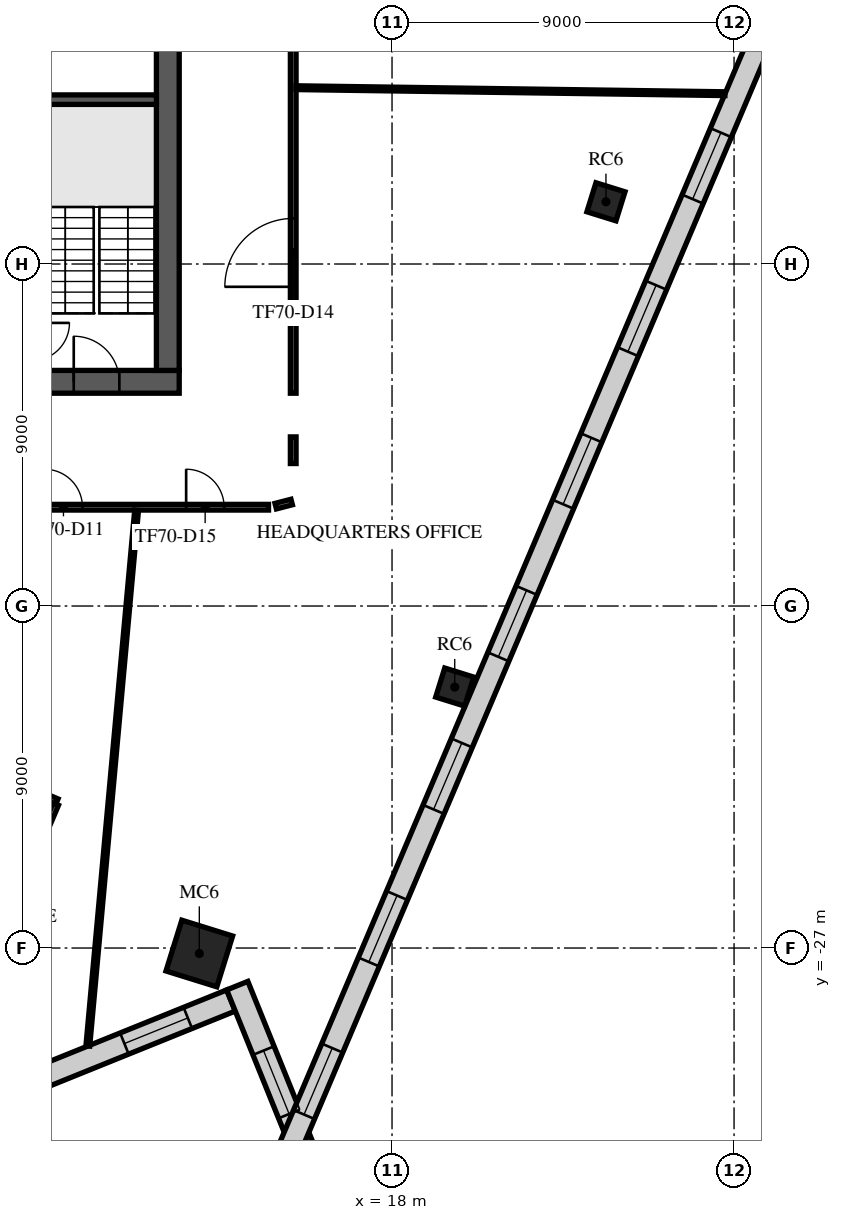
"""IFC4 building model, lengths in metres.
Left out: names, types, materials, properties, quantities, classifications, styles, units other than length and angle.
Written with IfcOpenShell. Run it as: python <this file> out.ifc"""

import sys

from ifc_helpers import new_model, si_unit, direction, frame, frame_2d, origin, origin_2d, place, context, subcontext, project, spatial, rectangle, extrude, element, fill, save


model = new_model("IFC4")
c1 = context("Model", 3, precision=1e-05, world=origin(), true_north=direction((0.0, 1.0)))
c2 = subcontext(c1, "Body", "Model", "MODEL_VIEW")
j1 = project(units=[si_unit("LENGTHUNIT", "METRE"), si_unit("PLANEANGLEUNIT", "RADIAN")], contexts=[c1])
p1 = place(None, origin())
s1 = spatial("IfcSite", under=j1, at=p1, CompositionType="ELEMENT")
p2 = place(p1, origin())
s2 = spatial("IfcBuilding", under=s1, at=p2, CompositionType="ELEMENT")
p3 = place(p2, frame((0.0, 0.0, 300.5)))
s3 = spatial("IfcBuildingStorey", under=s2, at=p3, CompositionType="ELEMENT", Elevation=300.5)
p4 = place(p3, frame((12.929, -27.144, 0.0), z_axis=(0.0, 0.0, 1.0), x_axis=(0.297503182032, 0.954720826567, 0.0)))
e1 = element("IfcColumn", 1, at=p4, inside=s3, PredefinedType="COLUMN", context=c2, shape_type="SweptSolid", body=[
    extrude(rectangle(XDim=1.4, YDim=1.4, at=origin_2d()), origin(), (0.0, 0.0, 1.0), 4.0),
])
for number, where, z_axis, x_axis in (
    (2, (19.65, -20.133, 0.0), (0.0, 0.0, 1.0), (0.298, 0.955, 0.0)),
    (3, (23.629, -7.363, 0.0), (0.0, 0.0, 1.0), (0.298, 0.955, 0.0)),
):
    element("IfcColumn", number, at=place(p3, frame(where, z_axis=z_axis, x_axis=x_axis)), inside=s3, PredefinedType="COLUMN", context=c2, shape_type="SweptSolid", body=[
        extrude(rectangle(XDim=0.8, YDim=0.8, at=origin_2d()), origin(), (0.0, 0.0, 1.0), 4.0),
    ])
p5 = place(p3, frame((-12.4, -12.1, 0.0), z_axis=(0.0, 0.0, 1.0), x_axis=(1.0, 0.0, 0.0)))
e4 = element("IfcWall", 4, at=p5, inside=s3, PredefinedType="SHEAR", context=c2, shape_type="SweptSolid", body=[
    extrude(rectangle(XDim=24.8, YDim=0.6, at=frame_2d((12.4, 0.0))), origin(), (0.0, 0.0, 1.0), 3.65),
])
p6 = place(p5, frame((7.3, 0.0, 0.0)))
e5 = element("IfcOpeningElement", 5, at=p6, cuts=e4, PredefinedType="OPENING", context=c2, shape_type="SweptSolid", body=[
    extrude(rectangle(XDim=2.0, YDim=2.1, at=frame_2d((1.0, 1.05))), frame((0.0, 0.31, 0.0), z_axis=(0.0, -1.0, 0.0), x_axis=(1.0, 0.0, 0.0)), (0.0, 0.0, 1.0), 0.62),
])
p7 = place(p5, frame((17.425, 0.0, 0.0)))
e6 = element("IfcOpeningElement", 6, at=p7, cuts=e4, PredefinedType="OPENING", context=c2, shape_type="SweptSolid", body=[
    extrude(rectangle(XDim=1.2, YDim=2.1, at=frame_2d((0.6, 1.05))), frame((0.0, 0.31, 0.0), z_axis=(0.0, -1.0, 0.0), x_axis=(1.0, 0.0, 0.0)), (0.0, 0.0, 1.0), 0.62),
])
p8 = place(p5, frame((1.575, 0.0, 0.0)))
e7 = element("IfcOpeningElement", 7, at=p8, cuts=e4, PredefinedType="OPENING", context=c2, shape_type="SweptSolid", body=[
    extrude(rectangle(XDim=1.2, YDim=2.1, at=frame_2d((0.6, 1.05))), frame((0.0, 0.31, 0.0), z_axis=(0.0, -1.0, 0.0), x_axis=(1.0, 0.0, 0.0)), (0.0, 0.0, 1.0), 0.62),
])
p9 = place(p5, frame((22.025, 0.0, 0.0)))
e8 = element("IfcOpeningElement", 8, at=p9, cuts=e4, PredefinedType="OPENING", context=c2, shape_type="SweptSolid", body=[
    extrude(rectangle(XDim=1.2, YDim=2.1, at=frame_2d((0.6, 1.05))), frame((0.0, 0.31, 0.0), z_axis=(0.0, -1.0, 0.0), x_axis=(1.0, 0.0, 0.0)), (0.0, 0.0, 1.0), 0.62),
])
p10 = place(p3, frame((12.1, -11.8, 0.0), z_axis=(0.0, 0.0, 1.0), x_axis=(0.0, 1.0, 0.0)))
e9 = element("IfcWall", 9, at=p10, inside=s3, PredefinedType="SHEAR", context=c2, shape_type="SweptSolid", body=[
    extrude(rectangle(XDim=23.6, YDim=0.6, at=frame_2d((11.8, 0.0))), origin(), (0.0, 0.0, 1.0), 3.65),
])
p11 = place(p10, frame((10.6, 0.0, 0.0)))
e10 = element("IfcOpeningElement", 10, at=p11, cuts=e9, PredefinedType="OPENING", context=c2, shape_type="SweptSolid", body=[
    extrude(rectangle(XDim=2.4, YDim=2.4, at=frame_2d((1.2, 1.2))), frame((0.0, 0.31, 0.0), z_axis=(0.0, -1.0, 0.0), x_axis=(1.0, 0.0, 0.0)), (0.0, 0.0, 1.0), 0.62),
])
p12 = place(p3, frame((8.65, -4.675, 0.0), z_axis=(0.0, 0.0, 1.0), x_axis=(1.0, 0.0, 0.0)))
e11 = element("IfcWall", 11, at=p12, inside=s3, PredefinedType="SOLIDWALL", context=c2, shape_type="SweptSolid", body=[
    extrude(rectangle(XDim=3.15, YDim=0.25, at=frame_2d((1.575, 0.0))), origin(), (0.0, 0.0, 1.0), 3.65),
])
p13 = place(p3, frame((5.881, -31.565, 0.0), z_axis=(0.0, 0.0, 1.0), x_axis=(0.927187551636, 0.37459744272, 0.0)))
e12 = element("IfcWall", 12, at=p13, inside=s3, PredefinedType="STANDARD", context=c2, shape_type="SweptSolid", body=[
    extrude(rectangle(XDim=8.5, YDim=0.6, at=frame_2d((4.25, 0.0))), origin(), (0.0, 0.0, 1.0), 3.65),
])
p14 = place(p13, frame((1.225, 0.0, 0.9)))
e13 = element("IfcOpeningElement", 13, at=p14, cuts=e12, PredefinedType="OPENING", context=c2, shape_type="SweptSolid", body=[
    extrude(rectangle(XDim=1.8, YDim=2.1, at=frame_2d((0.9, 1.05))), frame((0.0, 0.31, 0.0), z_axis=(0.0, -1.0, 0.0), x_axis=(1.0, 0.0, 0.0)), (0.0, 0.0, 1.0), 0.62),
])
p15 = place(p13, frame((5.475, 0.0, 0.9)))
e14 = element("IfcOpeningElement", 14, at=p15, cuts=e12, PredefinedType="OPENING", context=c2, shape_type="SweptSolid", body=[
    extrude(rectangle(XDim=1.8, YDim=2.1, at=frame_2d((0.9, 1.05))), frame((0.0, 0.31, 0.0), z_axis=(0.0, -1.0, 0.0), x_axis=(1.0, 0.0, 0.0)), (0.0, 0.0, 1.0), 0.62),
])
p16 = place(p3, frame((13.928, -27.99, 0.0), z_axis=(0.0, 0.0, 1.0), x_axis=(0.374576238335, -0.927196118238, 0.0)))
e15 = element("IfcWall", 15, at=p16, inside=s3, PredefinedType="STANDARD", context=c2, shape_type="SweptSolid", body=[
    extrude(rectangle(XDim=4.886, YDim=0.6, at=frame_2d((2.443, 0.0))), origin(), (0.0, 0.0, 1.0), 3.65),
])
p17 = place(p16, frame((1.843, 0.0, 0.9)))
e16 = element("IfcOpeningElement", 16, at=p17, cuts=e15, PredefinedType="OPENING", context=c2, shape_type="SweptSolid", body=[
    extrude(rectangle(XDim=1.8, YDim=2.1, at=frame_2d((0.9, 1.05))), frame((0.0, 0.31, 0.0), z_axis=(0.0, -1.0, 0.0), x_axis=(1.0, 0.0, 0.0)), (0.0, 0.0, 1.0), 0.62),
])
p18 = place(p3, frame((15.204, -32.515, 0.0), z_axis=(0.0, 0.0, 1.0), x_axis=(0.390728997462, 0.920505758017, 0.0)))
e17 = element("IfcWall", 17, at=p18, inside=s3, PredefinedType="STANDARD", context=c2, shape_type="SweptSolid", body=[
    extrude(rectangle(XDim=47.979, YDim=0.6, at=frame_2d((23.99, 0.0))), origin(), (0.0, 0.0, 1.0), 3.65),
])
p19 = place(p18, frame((1.231, 0.0, 0.9)))
e18 = element("IfcOpeningElement", 18, at=p19, cuts=e17, PredefinedType="OPENING", context=c2, shape_type="SweptSolid", body=[
    extrude(rectangle(XDim=1.9, YDim=2.1, at=frame_2d((0.95, 1.05))), frame((0.0, 0.31, 0.0), z_axis=(0.0, -1.0, 0.0), x_axis=(1.0, 0.0, 0.0)), (0.0, 0.0, 1.0), 0.62),
])
p20 = place(p18, frame((5.593, 0.0, 0.9)))
e19 = element("IfcOpeningElement", 19, at=p20, cuts=e17, PredefinedType="OPENING", context=c2, shape_type="SweptSolid", body=[
    extrude(rectangle(XDim=1.9, YDim=2.1, at=frame_2d((0.95, 1.05))), frame((0.0, 0.31, 0.0), z_axis=(0.0, -1.0, 0.0), x_axis=(1.0, 0.0, 0.0)), (0.0, 0.0, 1.0), 0.62),
])
p21 = place(p18, frame((9.954, 0.0, 0.9)))
e20 = element("IfcOpeningElement", 20, at=p21, cuts=e17, PredefinedType="OPENING", context=c2, shape_type="SweptSolid", body=[
    extrude(rectangle(XDim=1.9, YDim=2.1, at=frame_2d((0.95, 1.05))), frame((0.0, 0.31, 0.0), z_axis=(0.0, -1.0, 0.0), x_axis=(1.0, 0.0, 0.0)), (0.0, 0.0, 1.0), 0.62),
])
p22 = place(p18, frame((14.316, 0.0, 0.9)))
e21 = element("IfcOpeningElement", 21, at=p22, cuts=e17, PredefinedType="OPENING", context=c2, shape_type="SweptSolid", body=[
    extrude(rectangle(XDim=1.9, YDim=2.1, at=frame_2d((0.95, 1.05))), frame((0.0, 0.31, 0.0), z_axis=(0.0, -1.0, 0.0), x_axis=(1.0, 0.0, 0.0)), (0.0, 0.0, 1.0), 0.62),
])
p23 = place(p18, frame((18.678, 0.0, 0.9)))
e22 = element("IfcOpeningElement", 22, at=p23, cuts=e17, PredefinedType="OPENING", context=c2, shape_type="SweptSolid", body=[
    extrude(rectangle(XDim=1.9, YDim=2.1, at=frame_2d((0.95, 1.05))), frame((0.0, 0.31, 0.0), z_axis=(0.0, -1.0, 0.0), x_axis=(1.0, 0.0, 0.0)), (0.0, 0.0, 1.0), 0.62),
])
p24 = place(p18, frame((23.04, 0.0, 0.9)))
e23 = element("IfcOpeningElement", 23, at=p24, cuts=e17, PredefinedType="OPENING", context=c2, shape_type="SweptSolid", body=[
    extrude(rectangle(XDim=1.9, YDim=2.1, at=frame_2d((0.95, 1.05))), frame((0.0, 0.31, 0.0), z_axis=(0.0, -1.0, 0.0), x_axis=(1.0, 0.0, 0.0)), (0.0, 0.0, 1.0), 0.62),
])
p25 = place(p18, frame((27.401, 0.0, 0.9)))
e24 = element("IfcOpeningElement", 24, at=p25, cuts=e17, PredefinedType="OPENING", context=c2, shape_type="SweptSolid", body=[
    extrude(rectangle(XDim=1.9, YDim=2.1, at=frame_2d((0.95, 1.05))), frame((0.0, 0.31, 0.0), z_axis=(0.0, -1.0, 0.0), x_axis=(1.0, 0.0, 0.0)), (0.0, 0.0, 1.0), 0.62),
])
p26 = place(p18, frame((31.763, 0.0, 0.9)))
e25 = element("IfcOpeningElement", 25, at=p26, cuts=e17, PredefinedType="OPENING", context=c2, shape_type="SweptSolid", body=[
    extrude(rectangle(XDim=1.9, YDim=2.1, at=frame_2d((0.95, 1.05))), frame((0.0, 0.31, 0.0), z_axis=(0.0, -1.0, 0.0), x_axis=(1.0, 0.0, 0.0)), (0.0, 0.0, 1.0), 0.62),
])
p27 = place(p18, frame((36.125, 0.0, 0.9)))
e26 = element("IfcOpeningElement", 26, at=p27, cuts=e17, PredefinedType="OPENING", context=c2, shape_type="SweptSolid", body=[
    extrude(rectangle(XDim=1.9, YDim=2.1, at=frame_2d((0.95, 1.05))), frame((0.0, 0.31, 0.0), z_axis=(0.0, -1.0, 0.0), x_axis=(1.0, 0.0, 0.0)), (0.0, 0.0, 1.0), 0.62),
])
p28 = place(p18, frame((40.487, 0.0, 0.9)))
e27 = element("IfcOpeningElement", 27, at=p28, cuts=e17, PredefinedType="OPENING", context=c2, shape_type="SweptSolid", body=[
    extrude(rectangle(XDim=1.9, YDim=2.1, at=frame_2d((0.95, 1.05))), frame((0.0, 0.31, 0.0), z_axis=(0.0, -1.0, 0.0), x_axis=(1.0, 0.0, 0.0)), (0.0, 0.0, 1.0), 0.62),
])
p29 = place(p18, frame((44.848, 0.0, 0.9)))
e28 = element("IfcOpeningElement", 28, at=p29, cuts=e17, PredefinedType="OPENING", context=c2, shape_type="SweptSolid", body=[
    extrude(rectangle(XDim=1.9, YDim=2.1, at=frame_2d((0.95, 1.05))), frame((0.0, 0.31, 0.0), z_axis=(0.0, -1.0, 0.0), x_axis=(1.0, 0.0, 0.0)), (0.0, 0.0, 1.0), 0.62),
])
p30 = place(p3, frame((0.193, -19.329, 0.0), z_axis=(0.0, 0.0, 1.0), x_axis=(0.92050877494, -0.390721889914, 0.0)))
e29 = element("IfcWall", 29, at=p30, inside=s3, PredefinedType="PARTITIONING", context=c2, shape_type="SweptSolid", body=[
    extrude(rectangle(XDim=9.766, YDim=0.15, at=frame_2d((4.883, 0.0))), origin(), (0.0, 0.0, 1.0), 3.25),
])
p31 = place(p3, frame((1.304, -15.4, 0.0), z_axis=(0.0, 0.0, 1.0), x_axis=(1.0, 0.0, 0.0)))
e30 = element("IfcWall", 30, at=p31, inside=s3, PredefinedType="PARTITIONING", context=c2, shape_type="SweptSolid", body=[
    extrude(rectangle(XDim=13.446, YDim=0.15, at=frame_2d((6.723, 0.0))), origin(), (0.0, 0.0, 1.0), 3.25),
])
p32 = place(p31, frame((7.55, 0.0, 0.0)))
e31 = element("IfcOpeningElement", 31, at=p32, cuts=e30, PredefinedType="OPENING", context=c2, shape_type="SweptSolid", body=[
    extrude(rectangle(XDim=1.0, YDim=2.1, at=frame_2d((0.5, 1.05))), frame((0.0, 0.085, 0.0), z_axis=(0.0, -1.0, 0.0), x_axis=(1.0, 0.0, 0.0)), (0.0, 0.0, 1.0), 0.17),
])
p33 = place(p31, frame((11.278, 0.0, 0.0)))
e32 = element("IfcOpeningElement", 32, at=p33, cuts=e30, PredefinedType="OPENING", context=c2, shape_type="SweptSolid", body=[
    extrude(rectangle(XDim=1.0, YDim=2.1, at=frame_2d((0.5, 1.05))), frame((0.0, 0.085, 0.0), z_axis=(0.0, -1.0, 0.0), x_axis=(1.0, 0.0, 0.0)), (0.0, 0.0, 1.0), 0.17),
])
p34 = place(p3, frame((8.274, -25.285, 0.0), z_axis=(0.0, 0.0, 1.0), x_axis=(0.390878666815, 0.920442213194, 0.0)))
e33 = element("IfcWall", 33, at=p34, inside=s3, PredefinedType="PARTITIONING", context=c2, shape_type="SweptSolid", body=[
    extrude(rectangle(XDim=2.25, YDim=0.15, at=frame_2d((1.125, 0.0))), origin(), (0.0, 0.0, 1.0), 3.25),
])
p35 = place(p3, frame((15.36, -15.263, 0.0), z_axis=(0.0, 0.0, 1.0), x_axis=(-0.968229060736, -0.250064963452, 0.0)))
e34 = element("IfcWall", 34, at=p35, inside=s3, PredefinedType="PARTITIONING", context=c2, shape_type="SweptSolid", body=[
    extrude(rectangle(XDim=0.435, YDim=0.15, at=frame_2d((0.217, 0.0))), origin(), (0.0, 0.0, 1.0), 3.25),
])
p36 = place(p3, frame((15.4, -14.25, 0.0), z_axis=(0.0, 0.0, 1.0), x_axis=(0.0, 1.0, 0.0)))
e35 = element("IfcWall", 35, at=p36, inside=s3, PredefinedType="PARTITIONING", context=c2, shape_type="SweptSolid", body=[
    extrude(rectangle(XDim=0.7, YDim=0.15, at=frame_2d((0.35, 0.0))), origin(), (0.0, 0.0, 1.0), 3.65),
])
p37 = place(p3, frame((15.4, -12.4, 0.0), z_axis=(0.0, 0.0, 1.0), x_axis=(0.0, 1.0, 0.0)))
e36 = element("IfcWall", 36, at=p37, inside=s3, PredefinedType="PARTITIONING", context=c2, shape_type="SweptSolid", body=[
    extrude(rectangle(XDim=24.725, YDim=0.15, at=frame_2d((12.362, 0.0))), origin(), (0.0, 0.0, 1.0), 3.25),
])
p38 = place(p37, frame((2.8, 0.0, 0.0)))
e37 = element("IfcOpeningElement", 37, at=p38, cuts=e36, PredefinedType="OPENING", context=c2, shape_type="SweptSolid", body=[
    extrude(rectangle(XDim=1.8, YDim=2.1, at=frame_2d((0.9, 1.05))), frame((0.0, 0.085, 0.0), z_axis=(0.0, -1.0, 0.0), x_axis=(1.0, 0.0, 0.0)), (0.0, 0.0, 1.0), 0.17),
])
p39 = place(p37, frame((10.84, 0.0, 0.0)))
e38 = element("IfcOpeningElement", 38, at=p39, cuts=e36, PredefinedType="OPENING", context=c2, shape_type="SweptSolid", body=[
    extrude(rectangle(XDim=1.8, YDim=2.1, at=frame_2d((0.9, 1.05))), frame((0.0, 0.085, 0.0), z_axis=(0.0, -1.0, 0.0), x_axis=(1.0, 0.0, 0.0)), (0.0, 0.0, 1.0), 0.17),
])
p40 = place(p37, frame((17.59, 0.0, 0.0)))
e39 = element("IfcOpeningElement", 39, at=p40, cuts=e36, PredefinedType="OPENING", context=c2, shape_type="SweptSolid", body=[
    extrude(rectangle(XDim=1.0, YDim=2.1, at=frame_2d((0.5, 1.05))), frame((0.0, 0.085, 0.0), z_axis=(0.0, -1.0, 0.0), x_axis=(1.0, 0.0, 0.0)), (0.0, 0.0, 1.0), 0.17),
])
p41 = place(p37, frame((20.086, 0.0, 0.0)))
e40 = element("IfcOpeningElement", 40, at=p41, cuts=e36, PredefinedType="OPENING", context=c2, shape_type="SweptSolid", body=[
    extrude(rectangle(XDim=1.8, YDim=2.1, at=frame_2d((0.9, 1.05))), frame((0.0, 0.085, 0.0), z_axis=(0.0, -1.0, 0.0), x_axis=(1.0, 0.0, 0.0)), (0.0, 0.0, 1.0), 0.17),
])
p42 = place(p3, frame((9.995, -29.577, 0.0), z_axis=(0.0, 0.0, 1.0), x_axis=(0.090666368484, 0.995881323063, 0.0)))
e41 = element("IfcWall", 41, at=p42, inside=s3, PredefinedType="PARTITIONING", context=c2, shape_type="SweptSolid", body=[
    extrude(rectangle(XDim=14.156, YDim=0.1, at=frame_2d((7.078, 0.0))), origin(), (0.0, 0.0, 1.0), 3.65),
])
p43 = place(p3, frame((15.476, -4.36, 0.0), z_axis=(0.0, 0.0, 1.0), x_axis=(0.999902345391, -0.013974966252, 0.0)))
e42 = element("IfcWall", 42, at=p43, inside=s3, PredefinedType="PARTITIONING", context=c2, shape_type="SweptSolid", body=[
    extrude(rectangle(XDim=11.286, YDim=0.1, at=frame_2d((5.643, 0.0))), origin(), (0.0, 0.0, 1.0), 3.65),
])
p44 = place(p9, origin())
e43 = element("IfcDoor", 43, at=p44, inside=s3, OperationType="SINGLE_SWING_LEFT", PredefinedType="DOOR", context=c2, shape_type="SweptSolid", body=[
    extrude(rectangle(XDim=1.2, YDim=2.1, at=frame_2d((0.6, 1.05))), frame((0.0, 0.025, 0.0), z_axis=(0.0, -1.0, 0.0), x_axis=(1.0, 0.0, 0.0)), (0.0, 0.0, 1.0), 0.05),
])
fill(e8, e43)
p45 = place(p15, origin())
e44 = element("IfcWindow", 44, at=p45, inside=s3, PartitioningType="SINGLE_PANEL", PredefinedType="WINDOW", context=c2, shape_type="SweptSolid", body=[
    extrude(rectangle(XDim=1.8, YDim=2.1, at=frame_2d((0.9, 1.05))), frame((0.0, 0.03, 0.0), z_axis=(0.0, -1.0, 0.0), x_axis=(1.0, 0.0, 0.0)), (0.0, 0.0, 1.0), 0.06),
])
fill(e14, e44)
p46 = place(p17, origin())
e45 = element("IfcWindow", 45, at=p46, inside=s3, PartitioningType="SINGLE_PANEL", PredefinedType="WINDOW", context=c2, shape_type="SweptSolid", body=[
    extrude(rectangle(XDim=1.8, YDim=2.1, at=frame_2d((0.9, 1.05))), frame((0.0, 0.03, 0.0), z_axis=(0.0, -1.0, 0.0), x_axis=(1.0, 0.0, 0.0)), (0.0, 0.0, 1.0), 0.06),
])
fill(e16, e45)
p47 = place(p19, origin())
e46 = element("IfcWindow", 46, at=p47, inside=s3, PartitioningType="SINGLE_PANEL", PredefinedType="WINDOW", context=c2, shape_type="SweptSolid", body=[
    extrude(rectangle(XDim=1.9, YDim=2.1, at=frame_2d((0.95, 1.05))), frame((0.0, 0.03, 0.0), z_axis=(0.0, -1.0, 0.0), x_axis=(1.0, 0.0, 0.0)), (0.0, 0.0, 1.0), 0.06),
])
fill(e18, e46)
p48 = place(p20, origin())
e47 = element("IfcWindow", 47, at=p48, inside=s3, PartitioningType="SINGLE_PANEL", PredefinedType="WINDOW", context=c2, shape_type="SweptSolid", body=[
    extrude(rectangle(XDim=1.9, YDim=2.1, at=frame_2d((0.95, 1.05))), frame((0.0, 0.03, 0.0), z_axis=(0.0, -1.0, 0.0), x_axis=(1.0, 0.0, 0.0)), (0.0, 0.0, 1.0), 0.06),
])
fill(e19, e47)
p49 = place(p21, origin())
e48 = element("IfcWindow", 48, at=p49, inside=s3, PartitioningType="SINGLE_PANEL", PredefinedType="WINDOW", context=c2, shape_type="SweptSolid", body=[
    extrude(rectangle(XDim=1.9, YDim=2.1, at=frame_2d((0.95, 1.05))), frame((0.0, 0.03, 0.0), z_axis=(0.0, -1.0, 0.0), x_axis=(1.0, 0.0, 0.0)), (0.0, 0.0, 1.0), 0.06),
])
fill(e20, e48)
p50 = place(p22, origin())
e49 = element("IfcWindow", 49, at=p50, inside=s3, PartitioningType="SINGLE_PANEL", PredefinedType="WINDOW", context=c2, shape_type="SweptSolid", body=[
    extrude(rectangle(XDim=1.9, YDim=2.1, at=frame_2d((0.95, 1.05))), frame((0.0, 0.03, 0.0), z_axis=(0.0, -1.0, 0.0), x_axis=(1.0, 0.0, 0.0)), (0.0, 0.0, 1.0), 0.06),
])
fill(e21, e49)
p51 = place(p23, origin())
e50 = element("IfcWindow", 50, at=p51, inside=s3, PartitioningType="SINGLE_PANEL", PredefinedType="WINDOW", context=c2, shape_type="SweptSolid", body=[
    extrude(rectangle(XDim=1.9, YDim=2.1, at=frame_2d((0.95, 1.05))), frame((0.0, 0.03, 0.0), z_axis=(0.0, -1.0, 0.0), x_axis=(1.0, 0.0, 0.0)), (0.0, 0.0, 1.0), 0.06),
])
fill(e22, e50)
p52 = place(p24, origin())
e51 = element("IfcWindow", 51, at=p52, inside=s3, PartitioningType="SINGLE_PANEL", PredefinedType="WINDOW", context=c2, shape_type="SweptSolid", body=[
    extrude(rectangle(XDim=1.9, YDim=2.1, at=frame_2d((0.95, 1.05))), frame((0.0, 0.03, 0.0), z_axis=(0.0, -1.0, 0.0), x_axis=(1.0, 0.0, 0.0)), (0.0, 0.0, 1.0), 0.06),
])
fill(e23, e51)
p53 = place(p25, origin())
e52 = element("IfcWindow", 52, at=p53, inside=s3, PartitioningType="SINGLE_PANEL", PredefinedType="WINDOW", context=c2, shape_type="SweptSolid", body=[
    extrude(rectangle(XDim=1.9, YDim=2.1, at=frame_2d((0.95, 1.05))), frame((0.0, 0.03, 0.0), z_axis=(0.0, -1.0, 0.0), x_axis=(1.0, 0.0, 0.0)), (0.0, 0.0, 1.0), 0.06),
])
fill(e24, e52)
p54 = place(p32, frame((1.0, 0.0, 0.0), z_axis=(0.0, 0.0, 1.0), x_axis=(-1.0, 0.0, 0.0)))
e53 = element("IfcDoor", 53, at=p54, inside=s3, OperationType="SINGLE_SWING_RIGHT", PredefinedType="DOOR", context=c2, shape_type="SweptSolid", body=[
    extrude(rectangle(XDim=1.0, YDim=2.1, at=frame_2d((0.5, 1.05))), frame((0.0, 0.025, 0.0), z_axis=(0.0, -1.0, 0.0), x_axis=(1.0, 0.0, 0.0)), (0.0, 0.0, 1.0), 0.05),
])
fill(e31, e53)
p55 = place(p38, frame((1.8, 0.0, 0.0), z_axis=(0.0, 0.0, 1.0), x_axis=(-1.0, 0.0, 0.0)))
e54 = element("IfcDoor", 54, at=p55, inside=s3, OperationType="DOUBLE_DOOR_SINGLE_SWING", PredefinedType="DOOR", context=c2, shape_type="SweptSolid", body=[
    extrude(rectangle(XDim=1.8, YDim=2.1, at=frame_2d((0.9, 1.05))), frame((0.0, 0.025, 0.0), z_axis=(0.0, -1.0, 0.0), x_axis=(1.0, 0.0, 0.0)), (0.0, 0.0, 1.0), 0.05),
])
fill(e37, e54)
p56 = place(p33, frame((1.0, 0.0, 0.0), z_axis=(0.0, 0.0, 1.0), x_axis=(-1.0, 0.0, 0.0)))
e55 = element("IfcDoor", 55, at=p56, inside=s3, OperationType="SINGLE_SWING_RIGHT", PredefinedType="DOOR", context=c2, shape_type="SweptSolid", body=[
    extrude(rectangle(XDim=1.0, YDim=2.1, at=frame_2d((0.5, 1.05))), frame((0.0, 0.025, 0.0), z_axis=(0.0, -1.0, 0.0), x_axis=(1.0, 0.0, 0.0)), (0.0, 0.0, 1.0), 0.05),
])
fill(e32, e55)
save(model, sys.argv[1])
